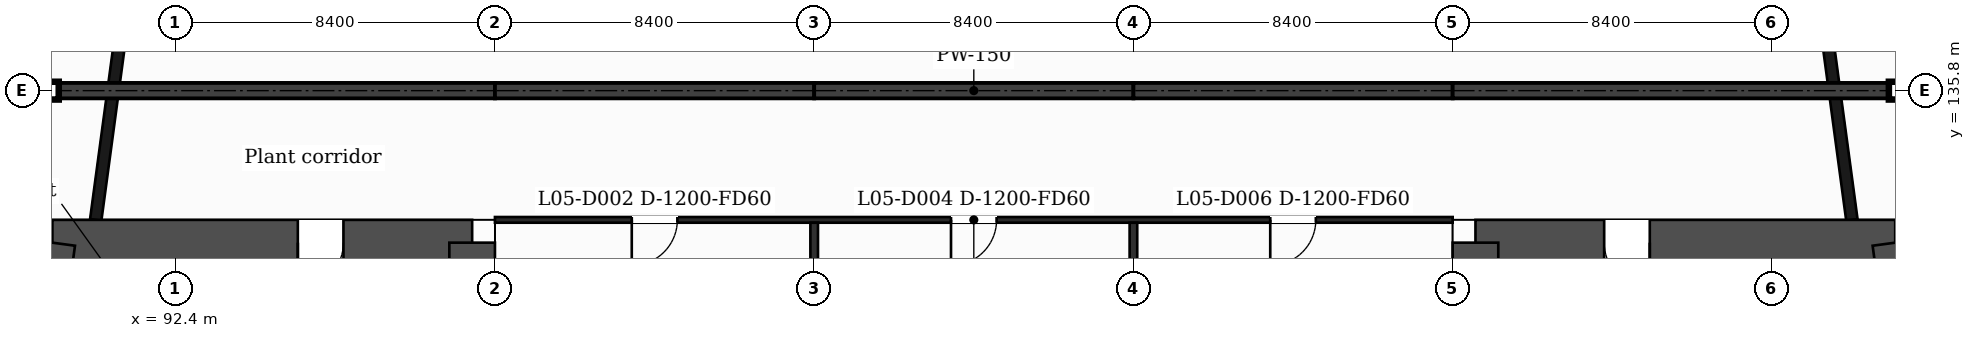
"""IFC4 building model, lengths in metres.
Left out: names, types, materials, properties, quantities, classifications, styles, units other than length and angle.
Written with IfcOpenShell. Run it as: python <this file> out.ifc"""

import sys

from ifc_helpers import new_model, si_unit, direction, frame, frame_2d, origin, place, context, subcontext, project, spatial, rectangle, extrude, element, fill, save


model = new_model("IFC4")
c1 = context("Model", 3, precision=1e-05, world=origin(), true_north=direction((0.0, 1.0)))
c2 = subcontext(c1, "Body", "Model", "MODEL_VIEW")
j1 = project(units=[si_unit("LENGTHUNIT", "METRE"), si_unit("PLANEANGLEUNIT", "RADIAN")], contexts=[c1])
p1 = place(None, origin())
s1 = spatial("IfcSite", under=j1, at=p1, CompositionType="ELEMENT")
p2 = place(p1, origin())
s2 = spatial("IfcBuilding", under=s1, at=p2, CompositionType="ELEMENT")
p3 = place(p2, frame((0.0, 0.0, 34.0)))
s3 = spatial("IfcBuildingStorey", under=s2, at=p3, CompositionType="ELEMENT", Elevation=34.0)
p4 = place(p3, frame((89.156, 131.8, 0.0), z_axis=(0.0, 0.0, 1.0), x_axis=(1.0, 0.0, 0.0)))
e1 = element("IfcWall", 1, at=p4, inside=s3, PredefinedType="SHEAR", context=c2, shape_type="SweptSolid", body=[
    extrude(rectangle(XDim=11.044, YDim=1.2, at=frame_2d((5.522, 0.0))), origin(), (0.0, 0.0, 1.0), 5.0),
])
p5 = place(p4, frame((6.458, 0.0, 0.0)))
e2 = element("IfcOpeningElement", 2, at=p5, cuts=e1, PredefinedType="OPENING", context=c2, shape_type="SweptSolid", body=[
    extrude(rectangle(XDim=1.2, YDim=2.1, at=frame_2d((0.6, 1.05))), frame((0.0, 0.61, 0.0), z_axis=(0.0, -1.0, 0.0), x_axis=(1.0, 0.0, 0.0)), (0.0, 0.0, 1.0), 1.22),
])
p6 = place(p3, frame((100.2, 131.8, 0.0), z_axis=(0.0, 0.0, 1.0), x_axis=(0.0, -1.0, 0.0)))
e3 = element("IfcWall", 3, at=p6, inside=s3, PredefinedType="SHEAR", context=c2, shape_type="SweptSolid", body=[
    extrude(rectangle(XDim=20.8, YDim=1.2, at=frame_2d((10.4, 0.0))), origin(), (0.0, 0.0, 1.0), 5.0),
])
p7 = place(p6, frame((7.65, 0.0, 0.0)))
e4 = element("IfcOpeningElement", 4, at=p7, cuts=e3, PredefinedType="OPENING", context=c2, shape_type="SweptSolid", body=[
    extrude(rectangle(XDim=1.4, YDim=2.1, at=frame_2d((0.7, 1.05))), frame((0.0, 0.61, 0.0), z_axis=(0.0, -1.0, 0.0), x_axis=(1.0, 0.0, 0.0)), (0.0, 0.0, 1.0), 1.22),
])
p8 = place(p3, frame((86.355, 111.0, 0.0), z_axis=(0.0, 0.0, 1.0), x_axis=(0.133413989637, 0.99106039542, 0.0)))
e5 = element("IfcWall", 5, at=p8, inside=s3, PredefinedType="SHEAR", context=c2, shape_type="SweptSolid", body=[
    extrude(rectangle(XDim=20.988, YDim=1.2, at=frame_2d((10.494, 0.0))), origin(), (0.0, 0.0, 1.0), 5.0),
])
p9 = place(p3, frame((126.6, 131.8, 0.0), z_axis=(0.0, 0.0, 1.0), x_axis=(1.0, 0.0, 0.0)))
e6 = element("IfcWall", 6, at=p9, inside=s3, PredefinedType="SHEAR", context=c2, shape_type="SweptSolid", body=[
    extrude(rectangle(XDim=11.044, YDim=1.2, at=frame_2d((5.522, 0.0))), origin(), (0.0, 0.0, 1.0), 5.0),
])
p10 = place(p9, frame((3.386, 0.0, 0.0)))
e7 = element("IfcOpeningElement", 7, at=p10, cuts=e6, PredefinedType="OPENING", context=c2, shape_type="SweptSolid", body=[
    extrude(rectangle(XDim=1.2, YDim=2.1, at=frame_2d((0.6, 1.05))), frame((0.0, 0.61, 0.0), z_axis=(0.0, -1.0, 0.0), x_axis=(1.0, 0.0, 0.0)), (0.0, 0.0, 1.0), 1.22),
])
p11 = place(p3, frame((137.645, 131.8, 0.0), z_axis=(0.0, 0.0, 1.0), x_axis=(0.133413989637, -0.99106039542, 0.0)))
e8 = element("IfcWall", 8, at=p11, inside=s3, PredefinedType="SHEAR", context=c2, shape_type="SweptSolid", body=[
    extrude(rectangle(XDim=20.988, YDim=1.2, at=frame_2d((10.494, 0.0))), origin(), (0.0, 0.0, 1.0), 5.0),
])
p12 = place(p3, frame((126.6, 111.0, 0.0), z_axis=(0.0, 0.0, 1.0), x_axis=(0.0, 1.0, 0.0)))
e9 = element("IfcWall", 9, at=p12, inside=s3, PredefinedType="SHEAR", context=c2, shape_type="SweptSolid", body=[
    extrude(rectangle(XDim=20.8, YDim=1.2, at=frame_2d((10.4, 0.0))), origin(), (0.0, 0.0, 1.0), 5.0),
])
p13 = place(p12, frame((11.75, 0.0, 0.0)))
e10 = element("IfcOpeningElement", 10, at=p13, cuts=e9, PredefinedType="OPENING", context=c2, shape_type="SweptSolid", body=[
    extrude(rectangle(XDim=1.4, YDim=2.1, at=frame_2d((0.7, 1.05))), frame((0.0, 0.61, 0.0), z_axis=(0.0, -1.0, 0.0), x_axis=(1.0, 0.0, 0.0)), (0.0, 0.0, 1.0), 1.22),
])
p14 = place(p3, frame((136.504, 132.4, 0.0), z_axis=(0.0, 0.0, 1.0), x_axis=(-0.133399697462, 0.99106231929, 0.0)))
e11 = element("IfcWall", 11, at=p14, inside=s3, PredefinedType="SOLIDWALL", context=c2, shape_type="SweptSolid", body=[
    extrude(rectangle(XDim=6.74, YDim=0.3, at=frame_2d((3.37, 0.0))), origin(), (0.0, 0.0, 1.0), 4.68),
])
p15 = place(p3, frame((91.177, 138.95, 0.0), z_axis=(0.0, 0.0, 1.0), x_axis=(-0.133426664613, -0.991058689065, 0.0)))
e12 = element("IfcWall", 12, at=p15, inside=s3, PredefinedType="SOLIDWALL", context=c2, shape_type="SweptSolid", body=[
    extrude(rectangle(XDim=6.609, YDim=0.3, at=frame_2d((3.305, 0.0))), origin(), (0.0, 0.0, 1.0), 4.68),
])
p16 = place(p3, frame((100.8, 132.4, 0.0), z_axis=(0.0, 0.0, 1.0), x_axis=(1.0, 0.0, 0.0)))
e13 = element("IfcWall", 13, at=p16, inside=s3, PredefinedType="PARTITIONING", context=c2, shape_type="SweptSolid", body=[
    extrude(rectangle(XDim=25.2, YDim=0.15, at=frame_2d((12.6, 0.0))), origin(), (0.0, 0.0, 1.0), 4.68),
])
p17 = place(p16, frame((3.6, 0.0, 0.0)))
e14 = element("IfcOpeningElement", 14, at=p17, cuts=e13, PredefinedType="OPENING", context=c2, shape_type="SweptSolid", body=[
    extrude(rectangle(XDim=1.2, YDim=2.1, at=frame_2d((0.6, 1.05))), frame((0.0, 0.085, 0.0), z_axis=(0.0, -1.0, 0.0), x_axis=(1.0, 0.0, 0.0)), (0.0, 0.0, 1.0), 0.17),
])
p18 = place(p16, frame((12.0, 0.0, 0.0)))
e15 = element("IfcOpeningElement", 15, at=p18, cuts=e13, PredefinedType="OPENING", context=c2, shape_type="SweptSolid", body=[
    extrude(rectangle(XDim=1.2, YDim=2.1, at=frame_2d((0.6, 1.05))), frame((0.0, 0.085, 0.0), z_axis=(0.0, -1.0, 0.0), x_axis=(1.0, 0.0, 0.0)), (0.0, 0.0, 1.0), 0.17),
])
p19 = place(p16, frame((20.4, 0.0, 0.0)))
e16 = element("IfcOpeningElement", 16, at=p19, cuts=e13, PredefinedType="OPENING", context=c2, shape_type="SweptSolid", body=[
    extrude(rectangle(XDim=1.2, YDim=2.1, at=frame_2d((0.6, 1.05))), frame((0.0, 0.085, 0.0), z_axis=(0.0, -1.0, 0.0), x_axis=(1.0, 0.0, 0.0)), (0.0, 0.0, 1.0), 0.17),
])
p20 = place(p3, frame((90.895, 135.8, 0.0), z_axis=(0.0, 0.0, 1.0), x_axis=(1.0, 0.0, 0.0)))
e17 = element("IfcWall", 17, at=p20, inside=s3, PredefinedType="PARTITIONING", context=c2, shape_type="SweptSolid", body=[
    extrude(rectangle(XDim=45.011, YDim=0.15, at=frame_2d((22.505, 0.0))), origin(), (0.0, 0.0, 1.0), 4.68),
])
for number, where, z_axis, x_axis in (
    (18, (109.2, 126.0, 0.0), (0.0, 0.0, 1.0), (0.0, 1.0, 0.0)),
    (19, (117.6, 126.0, 0.0), (0.0, 0.0, 1.0), (0.0, 1.0, 0.0)),
):
    element("IfcWall", number, at=place(p3, frame(where, z_axis=z_axis, x_axis=x_axis)), inside=s3, PredefinedType="PARTITIONING", context=c2, shape_type="SweptSolid", body=[
        extrude(rectangle(XDim=6.325, YDim=0.2, at=frame_2d((3.163, 0.0))), origin(), (0.0, 0.0, 1.0), 4.68),
    ])
p21 = place(p17, origin())
e20 = element("IfcDoor", 20, at=p21, inside=s3, OperationType="SINGLE_SWING_LEFT", PredefinedType="DOOR", context=c2, shape_type="SweptSolid", body=[
    extrude(rectangle(XDim=1.2, YDim=2.1, at=frame_2d((0.6, 1.05))), frame((0.0, 0.025, 0.0), z_axis=(0.0, -1.0, 0.0), x_axis=(1.0, 0.0, 0.0)), (0.0, 0.0, 1.0), 0.05),
])
fill(e14, e20)
p22 = place(p18, origin())
e21 = element("IfcDoor", 21, at=p22, inside=s3, OperationType="SINGLE_SWING_LEFT", PredefinedType="DOOR", context=c2, shape_type="SweptSolid", body=[
    extrude(rectangle(XDim=1.2, YDim=2.1, at=frame_2d((0.6, 1.05))), frame((0.0, 0.025, 0.0), z_axis=(0.0, -1.0, 0.0), x_axis=(1.0, 0.0, 0.0)), (0.0, 0.0, 1.0), 0.05),
])
fill(e15, e21)
p23 = place(p19, origin())
e22 = element("IfcDoor", 22, at=p23, inside=s3, OperationType="SINGLE_SWING_LEFT", PredefinedType="DOOR", context=c2, shape_type="SweptSolid", body=[
    extrude(rectangle(XDim=1.2, YDim=2.1, at=frame_2d((0.6, 1.05))), frame((0.0, 0.025, 0.0), z_axis=(0.0, -1.0, 0.0), x_axis=(1.0, 0.0, 0.0)), (0.0, 0.0, 1.0), 0.05),
])
fill(e16, e22)
p24 = place(p5, origin())
e23 = element("IfcDoor", 23, at=p24, inside=s3, OperationType="SINGLE_SWING_LEFT", PredefinedType="DOOR", context=c2, shape_type="SweptSolid", body=[
    extrude(rectangle(XDim=1.2, YDim=2.1, at=frame_2d((0.6, 1.05))), frame((0.0, 0.025, 0.0), z_axis=(0.0, -1.0, 0.0), x_axis=(1.0, 0.0, 0.0)), (0.0, 0.0, 1.0), 0.05),
])
fill(e2, e23)
p25 = place(p10, origin())
e24 = element("IfcDoor", 24, at=p25, inside=s3, OperationType="SINGLE_SWING_RIGHT", PredefinedType="DOOR", context=c2, shape_type="SweptSolid", body=[
    extrude(rectangle(XDim=1.2, YDim=2.1, at=frame_2d((0.6, 1.05))), frame((0.0, 0.025, 0.0), z_axis=(0.0, -1.0, 0.0), x_axis=(1.0, 0.0, 0.0)), (0.0, 0.0, 1.0), 0.05),
])
fill(e7, e24)
save(model, sys.argv[1])
